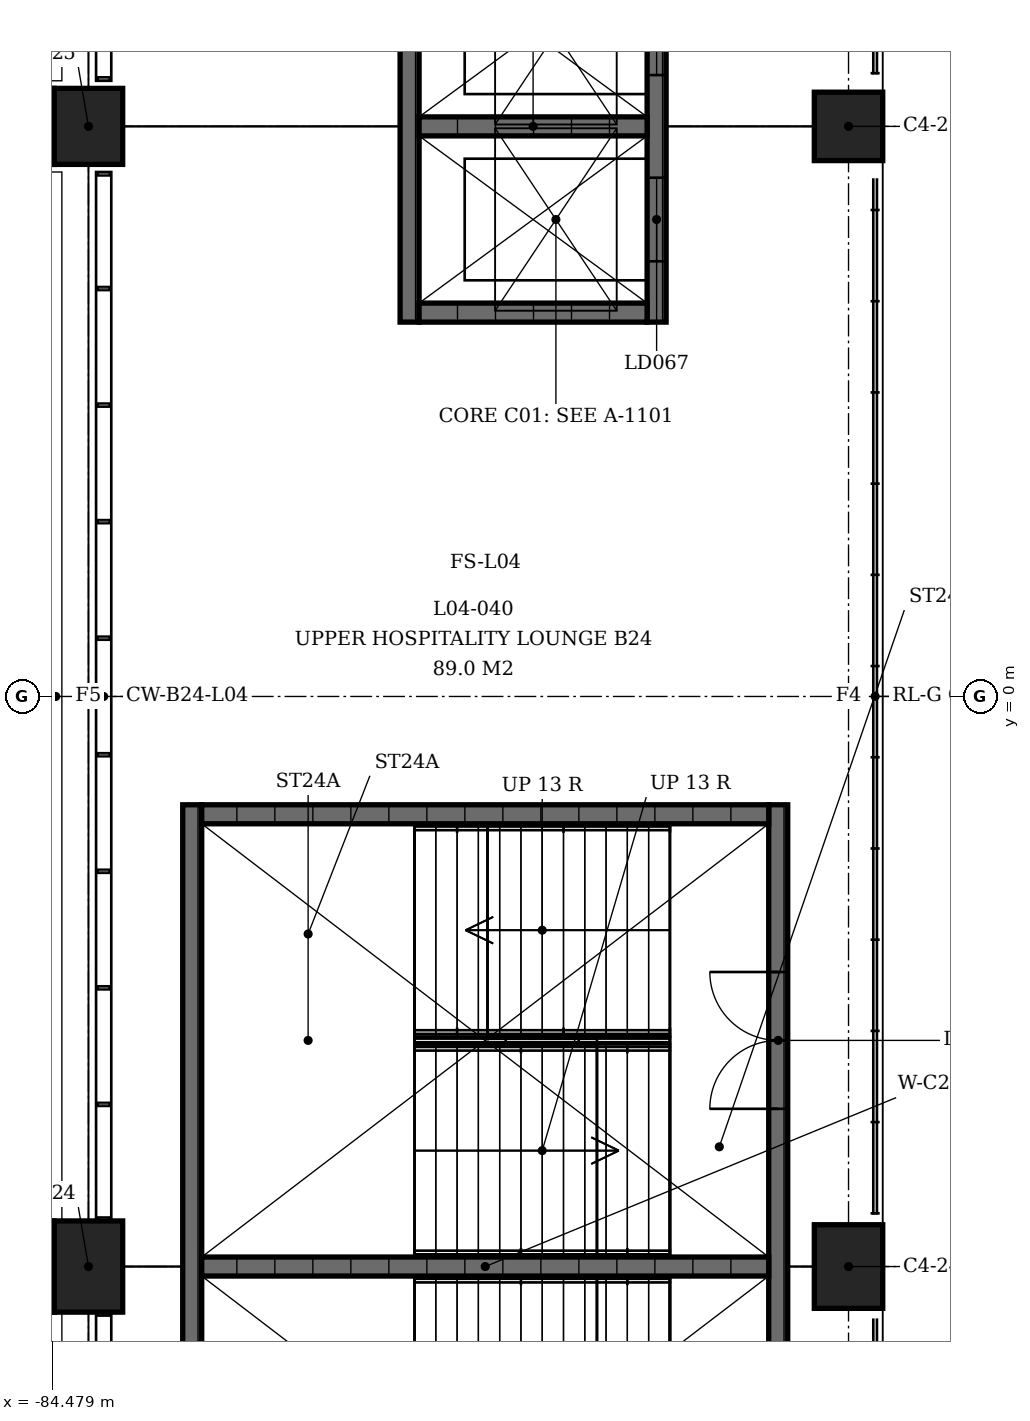
"""IFC4 building model, lengths in metres.
Left out: names, types, materials, properties, quantities, classifications, styles, units other than length and angle.
Written with IfcOpenShell. Run it as: python <this file> out.ifc"""

import sys

from ifc_helpers import new_model, si_unit, direction, frame, frame_2d, origin, origin_2d, place, context, subcontext, project, spatial, rectangle, extrude, element, fill, save


model = new_model("IFC4")
c1 = context("Model", 3, precision=1e-05, world=origin(), true_north=direction((0.0, 1.0)))
c2 = subcontext(c1, "Body", "Model", "MODEL_VIEW")
j1 = project(units=[si_unit("LENGTHUNIT", "METRE"), si_unit("PLANEANGLEUNIT", "RADIAN")], contexts=[c1])
p1 = place(None, origin())
s1 = spatial("IfcSite", under=j1, at=p1, CompositionType="ELEMENT")
p2 = place(p1, origin())
s2 = spatial("IfcBuilding", under=s1, at=p2, CompositionType="ELEMENT")
p3 = place(p2, frame((0.0, 0.0, 18.0)))
s3 = spatial("IfcBuildingStorey", under=s2, at=p3, CompositionType="ELEMENT", Elevation=18.0)
p4 = place(p3, frame((-74.0, -7.5, 0.0), z_axis=(0.0, 0.0, 1.0), x_axis=(0.0, -1.0, 0.0)))
e1 = element("IfcColumn", 1, at=p4, inside=s3, PredefinedType="COLUMN", context=c2, shape_type="SweptSolid", body=[
    extrude(rectangle(XDim=1.1, YDim=0.9, at=origin_2d()), origin(), (0.0, 0.0, 1.0), 4.5),
])
p5 = place(p3, frame((-84.0, -7.5, 0.0), z_axis=(0.0, 0.0, 1.0), x_axis=(0.0, -1.0, 0.0)))
e2 = element("IfcColumn", 2, at=p5, inside=s3, PredefinedType="COLUMN", context=c2, shape_type="SweptSolid", body=[
    extrude(rectangle(XDim=1.2, YDim=0.9, at=origin_2d()), origin(), (0.0, 0.0, 1.0), 4.5),
])
p6 = place(p3, frame((-74.0, 7.5, 0.0), z_axis=(0.0, 0.0, 1.0), x_axis=(0.0, -1.0, 0.0)))
e3 = element("IfcColumn", 3, at=p6, inside=s3, PredefinedType="COLUMN", context=c2, shape_type="SweptSolid", body=[
    extrude(rectangle(XDim=0.9, YDim=0.9, at=origin_2d()), origin(), (0.0, 0.0, 1.0), 4.5),
])
p7 = place(p3, frame((-84.0, 7.5, 0.0), z_axis=(0.0, 0.0, 1.0), x_axis=(0.0, -1.0, 0.0)))
e4 = element("IfcColumn", 4, at=p7, inside=s3, PredefinedType="COLUMN", context=c2, shape_type="SweptSolid", body=[
    extrude(rectangle(XDim=1.0, YDim=0.9, at=origin_2d()), origin(), (0.0, 0.0, 1.0), 4.5),
])
p8 = place(p3, frame((-74.925, -1.425, 0.0), z_axis=(0.0, 0.0, 1.0), x_axis=(0.0, -1.0, 0.0)))
e5 = element("IfcWall", 5, at=p8, inside=s3, PredefinedType="SHEAR", context=c2, shape_type="SweptSolid", body=[
    extrude(rectangle(XDim=12.15, YDim=0.25, at=frame_2d((6.075, 0.0))), origin(), (0.0, 0.0, 1.0), 4.09),
])
p9 = place(p8, frame((2.2, 0.0, 0.0)))
e6 = element("IfcOpeningElement", 6, at=p9, cuts=e5, PredefinedType="OPENING", context=c2, shape_type="SweptSolid", body=[
    extrude(rectangle(XDim=1.8, YDim=2.1, at=frame_2d((0.9, 1.05))), frame((0.0, 0.125, 0.0), z_axis=(0.0, -1.0, 0.0), x_axis=(1.0, 0.0, 0.0)), (0.0, 0.0, 1.0), 0.25),
])
p10 = place(p8, frame((8.15, 0.0, 0.0)))
e7 = element("IfcOpeningElement", 7, at=p10, cuts=e5, PredefinedType="OPENING", context=c2, shape_type="SweptSolid", body=[
    extrude(rectangle(XDim=1.8, YDim=2.1, at=frame_2d((0.9, 1.05))), frame((0.0, 0.125, 0.0), z_axis=(0.0, -1.0, 0.0), x_axis=(1.0, 0.0, 0.0)), (0.0, 0.0, 1.0), 0.25),
])
p11 = place(p3, frame((-82.635, -1.425, 0.0), z_axis=(0.0, 0.0, 1.0), x_axis=(0.0, -1.0, 0.0)))
e8 = element("IfcWall", 8, at=p11, inside=s3, PredefinedType="SHEAR", context=c2, shape_type="SweptSolid", body=[
    extrude(rectangle(XDim=12.15, YDim=0.25, at=frame_2d((6.075, 0.0))), origin(), (0.0, 0.0, 1.0), 4.09),
])
for number, where, z_axis, x_axis in (
    (9, (-75.05, -1.55, 0.0), (0.0, 0.0, 1.0), (-1.0, 0.0, 0.0)),
    (10, (-75.05, -7.5, 0.0), (0.0, 0.0, 1.0), (-1.0, 0.0, 0.0)),
):
    element("IfcWall", number, at=place(p3, frame(where, z_axis=z_axis, x_axis=x_axis)), inside=s3, PredefinedType="SHEAR", context=c2, shape_type="SweptSolid", body=[
        extrude(rectangle(XDim=7.46, YDim=0.25, at=frame_2d((3.73, 0.0))), origin(), (0.0, 0.0, 1.0), 4.09),
    ])
p12 = place(p3, frame((-76.525, 10.075, 0.0), z_axis=(0.0, 0.0, 1.0), x_axis=(0.0, -1.0, 0.0)))
e11 = element("IfcWall", 11, at=p12, inside=s3, PredefinedType="SHEAR", context=c2, shape_type="SweptSolid", body=[
    extrude(rectangle(XDim=5.15, YDim=0.25, at=frame_2d((2.575, 0.0))), origin(), (0.0, 0.0, 1.0), 4.09),
])
p13 = place(p12, frame((0.8, 0.0, 0.0)))
e12 = element("IfcOpeningElement", 12, at=p13, cuts=e11, PredefinedType="OPENING", context=c2, shape_type="SweptSolid", body=[
    extrude(rectangle(XDim=1.1, YDim=2.1, at=frame_2d((0.55, 1.05))), frame((0.0, 0.125, 0.0), z_axis=(0.0, -1.0, 0.0), x_axis=(1.0, 0.0, 0.0)), (0.0, 0.0, 1.0), 0.25),
])
p14 = place(p12, frame((3.25, 0.0, 0.0)))
e13 = element("IfcOpeningElement", 13, at=p14, cuts=e11, PredefinedType="OPENING", context=c2, shape_type="SweptSolid", body=[
    extrude(rectangle(XDim=1.1, YDim=2.1, at=frame_2d((0.55, 1.05))), frame((0.0, 0.125, 0.0), z_axis=(0.0, -1.0, 0.0), x_axis=(1.0, 0.0, 0.0)), (0.0, 0.0, 1.0), 0.25),
])
p15 = place(p3, frame((-79.775, 10.075, 0.0), z_axis=(0.0, 0.0, 1.0), x_axis=(0.0, -1.0, 0.0)))
e14 = element("IfcWall", 14, at=p15, inside=s3, PredefinedType="SHEAR", context=c2, shape_type="SweptSolid", body=[
    extrude(rectangle(XDim=5.15, YDim=0.25, at=frame_2d((2.575, 0.0))), origin(), (0.0, 0.0, 1.0), 4.09),
])
for number, where, z_axis, x_axis in (
    (15, (-76.65, 5.05, 0.0), (0.0, 0.0, 1.0), (-1.0, 0.0, 0.0)),
    (16, (-76.65, 7.5, 0.0), (0.0, 0.0, 1.0), (-1.0, 0.0, 0.0)),
):
    element("IfcWall", number, at=place(p3, frame(where, z_axis=z_axis, x_axis=x_axis)), inside=s3, PredefinedType="SHEAR", context=c2, shape_type="SweptSolid", body=[
        extrude(rectangle(XDim=3.0, YDim=0.25, at=frame_2d((1.5, 0.0))), origin(), (0.0, 0.0, 1.0), 4.09),
    ])
p16 = place(p9, origin())
e17 = element("IfcDoor", 17, at=p16, inside=s3, OperationType="DOUBLE_DOOR_SINGLE_SWING", PredefinedType="DOOR", context=c2, shape_type="SweptSolid", body=[
    extrude(rectangle(XDim=1.8, YDim=2.1, at=frame_2d((0.9, 1.05))), frame((0.0, 0.025, 0.0), z_axis=(0.0, -1.0, 0.0), x_axis=(1.0, 0.0, 0.0)), (0.0, 0.0, 1.0), 0.05),
])
fill(e6, e17)
p17 = place(p13, origin())
e18 = element("IfcDoor", 18, at=p17, inside=s3, OperationType="SLIDING_TO_LEFT", PredefinedType="DOOR", context=c2, shape_type="SweptSolid", body=[
    extrude(rectangle(XDim=1.1, YDim=2.1, at=frame_2d((0.55, 1.05))), frame((0.0, 0.025, 0.0), z_axis=(0.0, -1.0, 0.0), x_axis=(1.0, 0.0, 0.0)), (0.0, 0.0, 1.0), 0.05),
])
fill(e12, e18)
p18 = place(p14, origin())
e19 = element("IfcDoor", 19, at=p18, inside=s3, OperationType="SLIDING_TO_LEFT", PredefinedType="DOOR", context=c2, shape_type="SweptSolid", body=[
    extrude(rectangle(XDim=1.1, YDim=2.1, at=frame_2d((0.55, 1.05))), frame((0.0, 0.025, 0.0), z_axis=(0.0, -1.0, 0.0), x_axis=(1.0, 0.0, 0.0)), (0.0, 0.0, 1.0), 0.05),
])
fill(e13, e19)
save(model, sys.argv[1])
